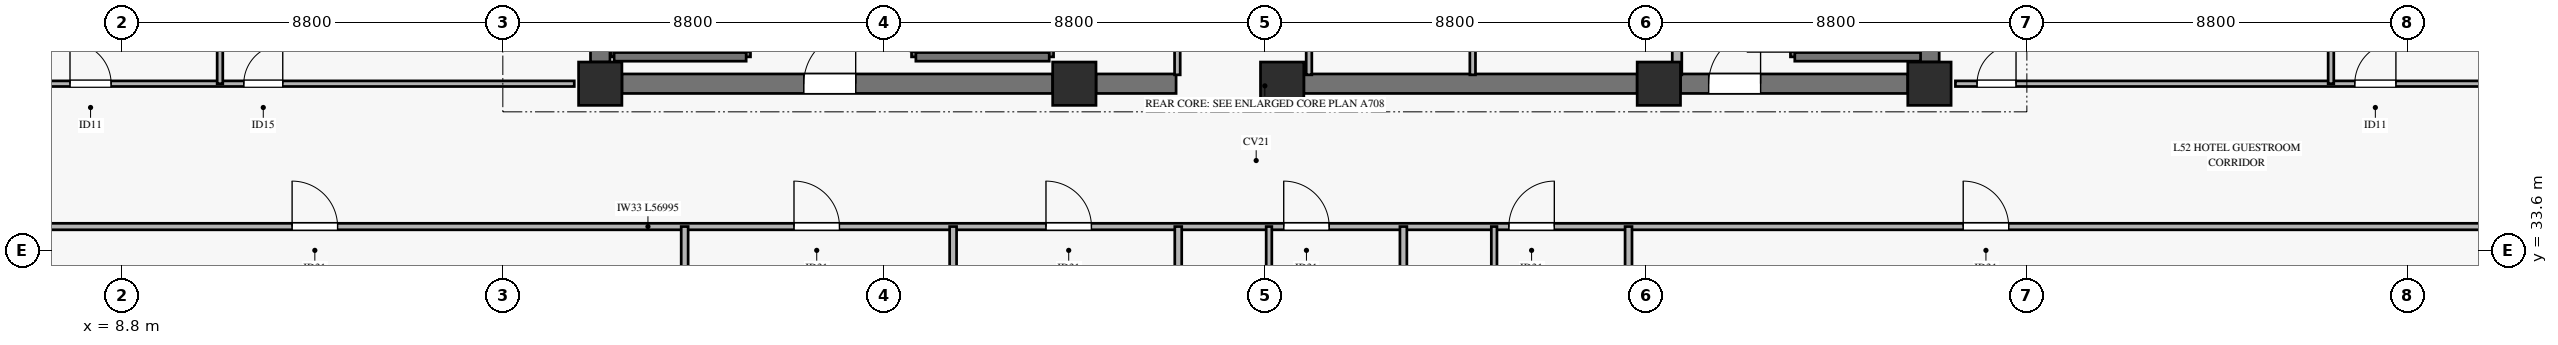
"""IFC4 building model, lengths in metres.
Left out: names, types, materials, properties, quantities, classifications, styles, units other than length and angle.
Written with IfcOpenShell. Run it as: python <this file> out.ifc"""

import sys

from ifc_helpers import new_model, si_unit, direction, frame, frame_2d, origin, origin_2d, place, context, subcontext, project, spatial, rectangle, extrude, source, transform, mapped, element, fill, save


model = new_model("IFC4")
c1 = context("Model", 3, precision=1e-05, world=origin(), true_north=direction((0.0, 1.0)))
c2 = subcontext(c1, "Body", "Model", "MODEL_VIEW")
j1 = project(units=[si_unit("LENGTHUNIT", "METRE"), si_unit("PLANEANGLEUNIT", "RADIAN")], contexts=[c1])
p1 = place(None, origin())
s1 = spatial("IfcSite", under=j1, at=p1, CompositionType="ELEMENT")
p2 = place(p1, origin())
s2 = spatial("IfcBuilding", under=s1, at=p2, CompositionType="ELEMENT")
p3 = place(p2, frame((0.0, 0.0, 206.2)))
s3 = spatial("IfcBuildingStorey", under=s2, at=p3, CompositionType="ELEMENT", Elevation=206.2)
m1 = source(origin(), c2, "Body", "SweptSolid", [
    extrude(rectangle(XDim=1.0, YDim=1.0, at=origin_2d()), origin(), (0.0, 0.0, 1.0), 3.27),
])
for number, where, z_axis, x_axis in (
    (1, (19.85, 37.45, 0.0), (0.0, 0.0, 1.0), (1.0, 0.0, 0.0)),
    (2, (30.8, 37.45, 0.0), (0.0, 0.0, 1.0), (1.0, 0.0, 0.0)),
    (3, (35.6, 37.45, 0.0), (0.0, 0.0, 1.0), (1.0, 0.0, 0.0)),
    (4, (44.3, 37.45, 0.0), (0.0, 0.0, 1.0), (1.0, 0.0, 0.0)),
    (5, (50.55, 37.45, 0.0), (0.0, 0.0, 1.0), (1.0, 0.0, 0.0)),
):
    element("IfcColumn", number, at=place(p3, frame(where, z_axis=z_axis, x_axis=x_axis)), inside=s3, PredefinedType="PILASTER", context=c2, shape_type="MappedRepresentation", body=[
        mapped(m1, transform((0.0, 0.0, 0.0), x_axis=(1.0, 0.0, 0.0), y_axis=(0.0, 1.0, 0.0), z_axis=(0.0, 0.0, 1.0), scale=1.0)),
    ])
p4 = place(p3, frame((20.35, 37.45, 0.0), z_axis=(0.0, 0.0, 1.0), x_axis=(1.0, 0.0, 0.0)))
e6 = element("IfcWall", 6, at=p4, inside=s3, PredefinedType="SHEAR", context=c2, shape_type="SweptSolid", body=[
    extrude(rectangle(XDim=9.95, YDim=0.45, at=frame_2d((4.975, 0.0))), origin(), (0.0, 0.0, 1.0), 3.27),
])
p5 = place(p4, frame((4.2, 0.0, 0.0)))
e7 = element("IfcOpeningElement", 7, at=p5, cuts=e6, PredefinedType="OPENING", context=c2, shape_type="SweptSolid", body=[
    extrude(rectangle(XDim=1.2, YDim=2.15, at=frame_2d((0.6, 1.075))), frame((0.0, 0.235, 0.0), z_axis=(0.0, -1.0, 0.0), x_axis=(1.0, 0.0, 0.0)), (0.0, 0.0, 1.0), 0.47),
])
p6 = place(p3, frame((31.3, 37.45, 0.0), z_axis=(0.0, 0.0, 1.0), x_axis=(1.0, 0.0, 0.0)))
e8 = element("IfcWall", 8, at=p6, inside=s3, PredefinedType="SHEAR", context=c2, shape_type="SweptSolid", body=[
    extrude(rectangle(XDim=1.85, YDim=0.45, at=frame_2d((0.925, 0.0))), origin(), (0.0, 0.0, 1.0), 3.27),
])
p7 = place(p3, frame((36.1, 37.45, 0.0), z_axis=(0.0, 0.0, 1.0), x_axis=(1.0, 0.0, 0.0)))
e9 = element("IfcWall", 9, at=p7, inside=s3, PredefinedType="SHEAR", context=c2, shape_type="SweptSolid", body=[
    extrude(rectangle(XDim=7.7, YDim=0.45, at=frame_2d((3.85, 0.0))), origin(), (0.0, 0.0, 1.0), 3.27),
])
p8 = place(p3, frame((44.8, 37.45, 0.0), z_axis=(0.0, 0.0, 1.0), x_axis=(1.0, 0.0, 0.0)))
e10 = element("IfcWall", 10, at=p8, inside=s3, PredefinedType="SHEAR", context=c2, shape_type="SweptSolid", body=[
    extrude(rectangle(XDim=5.25, YDim=0.45, at=frame_2d((2.625, 0.0))), origin(), (0.0, 0.0, 1.0), 3.27),
])
p9 = place(p8, frame((0.65, 0.0, 0.0)))
e11 = element("IfcOpeningElement", 11, at=p9, cuts=e10, PredefinedType="OPENING", context=c2, shape_type="SweptSolid", body=[
    extrude(rectangle(XDim=1.2, YDim=2.15, at=frame_2d((0.6, 1.075))), frame((0.0, 0.235, 0.0), z_axis=(0.0, -1.0, 0.0), x_axis=(1.0, 0.0, 0.0)), (0.0, 0.0, 1.0), 0.47),
])
for number, where, z_axis, x_axis in (
    (12, (19.85, 37.95, 0.0), (0.0, 0.0, 1.0), (0.0, 1.0, 0.0)),
    (13, (50.55, 37.95, 0.0), (0.0, 0.0, 1.0), (0.0, 1.0, 0.0)),
):
    element("IfcWall", number, at=place(p3, frame(where, z_axis=z_axis, x_axis=x_axis)), inside=s3, PredefinedType="SHEAR", context=c2, shape_type="SweptSolid", body=[
        extrude(rectangle(XDim=8.1, YDim=0.45, at=frame_2d((4.05, 0.0))), origin(), (0.0, 0.0, 1.0), 3.27),
    ])
p10 = place(p3, frame((20.17, 38.07, 0.0), z_axis=(0.0, 0.0, 1.0), x_axis=(0.0, 1.0, 0.0)))
e14 = element("IfcWall", 14, at=p10, inside=s3, PredefinedType="SOLIDWALL", context=c2, shape_type="SweptSolid", body=[
    extrude(rectangle(XDim=7.25, YDim=0.14, at=frame_2d((3.625, 0.0))), origin(), (0.0, 0.0, 1.0), 3.5),
])
p11 = place(p3, frame((23.22, 38.07, 0.0), z_axis=(0.0, 0.0, 1.0), x_axis=(0.0, 1.0, 0.0)))
e15 = element("IfcWall", 15, at=p11, inside=s3, PredefinedType="SOLIDWALL", context=c2, shape_type="SweptSolid", body=[
    extrude(rectangle(XDim=7.25, YDim=0.2, at=frame_2d((3.625, 0.0))), origin(), (0.0, 0.0, 1.0), 3.5),
])
p12 = place(p11, frame((0.11, 0.0, 0.0)))
e16 = element("IfcOpeningElement", 16, at=p12, cuts=e15, PredefinedType="OPENING", context=c2, shape_type="SweptSolid", body=[
    extrude(rectangle(XDim=1.1, YDim=2.15, at=frame_2d((0.55, 1.075))), frame((0.0, 0.11, 0.0), z_axis=(0.0, -1.0, 0.0), x_axis=(1.0, 0.0, 0.0)), (0.0, 0.0, 1.0), 0.22),
])
p13 = place(p3, frame((20.17, 38.07, 0.0), z_axis=(0.0, 0.0, 1.0), x_axis=(1.0, 0.0, 0.0)))
e17 = element("IfcWall", 17, at=p13, inside=s3, PredefinedType="SOLIDWALL", context=c2, shape_type="SweptSolid", body=[
    extrude(rectangle(XDim=3.05, YDim=0.2, at=frame_2d((1.525, 0.0))), origin(), (0.0, 0.0, 1.0), 3.5),
])
p14 = place(p3, frame((27.14, 38.07, 0.0), z_axis=(0.0, 0.0, 1.0), x_axis=(0.0, 1.0, 0.0)))
e18 = element("IfcWall", 18, at=p14, inside=s3, PredefinedType="SOLIDWALL", context=c2, shape_type="SweptSolid", body=[
    extrude(rectangle(XDim=7.25, YDim=0.2, at=frame_2d((3.625, 0.0))), origin(), (0.0, 0.0, 1.0), 3.5),
])
p15 = place(p14, frame((0.11, 0.0, 0.0)))
e19 = element("IfcOpeningElement", 19, at=p15, cuts=e18, PredefinedType="OPENING", context=c2, shape_type="SweptSolid", body=[
    extrude(rectangle(XDim=1.1, YDim=2.15, at=frame_2d((0.55, 1.075))), frame((0.0, 0.11, 0.0), z_axis=(0.0, -1.0, 0.0), x_axis=(1.0, 0.0, 0.0)), (0.0, 0.0, 1.0), 0.22),
])
p16 = place(p3, frame((30.22, 38.07, 0.0), z_axis=(0.0, 0.0, 1.0), x_axis=(0.0, 1.0, 0.0)))
e20 = element("IfcWall", 20, at=p16, inside=s3, PredefinedType="SOLIDWALL", context=c2, shape_type="SweptSolid", body=[
    extrude(rectangle(XDim=7.25, YDim=0.2, at=frame_2d((3.625, 0.0))), origin(), (0.0, 0.0, 1.0), 3.5),
])
p17 = place(p3, frame((27.14, 38.07, 0.0), z_axis=(0.0, 0.0, 1.0), x_axis=(1.0, 0.0, 0.0)))
e21 = element("IfcWall", 21, at=p17, inside=s3, PredefinedType="SOLIDWALL", context=c2, shape_type="SweptSolid", body=[
    extrude(rectangle(XDim=3.08, YDim=0.2, at=frame_2d((1.54, 0.0))), origin(), (0.0, 0.0, 1.0), 3.5),
])
p18 = place(p3, frame((47.44, 38.07, 0.0), z_axis=(0.0, 0.0, 1.0), x_axis=(0.0, 1.0, 0.0)))
e22 = element("IfcWall", 22, at=p18, inside=s3, PredefinedType="SOLIDWALL", context=c2, shape_type="SweptSolid", body=[
    extrude(rectangle(XDim=7.25, YDim=0.2, at=frame_2d((3.625, 0.0))), origin(), (0.0, 0.0, 1.0), 3.5),
])
p19 = place(p18, frame((0.11, 0.0, 0.0)))
e23 = element("IfcOpeningElement", 23, at=p19, cuts=e22, PredefinedType="OPENING", context=c2, shape_type="SweptSolid", body=[
    extrude(rectangle(XDim=1.1, YDim=2.15, at=frame_2d((0.55, 1.075))), frame((0.0, 0.11, 0.0), z_axis=(0.0, -1.0, 0.0), x_axis=(1.0, 0.0, 0.0)), (0.0, 0.0, 1.0), 0.22),
])
p20 = place(p3, frame((47.44, 38.07, 0.0), z_axis=(0.0, 0.0, 1.0), x_axis=(1.0, 0.0, 0.0)))
e24 = element("IfcWall", 24, at=p20, inside=s3, PredefinedType="SOLIDWALL", context=c2, shape_type="SweptSolid", body=[
    extrude(rectangle(XDim=2.905, YDim=0.2, at=frame_2d((1.453, 0.0))), origin(), (0.0, 0.0, 1.0), 3.5),
])
p21 = place(p3, frame((44.72, 37.655, 0.0), z_axis=(0.0, 0.0, 1.0), x_axis=(0.0, 1.0, 0.0)))
e25 = element("IfcWall", 25, at=p21, inside=s3, PredefinedType="SOLIDWALL", context=c2, shape_type="SweptSolid", body=[
    extrude(rectangle(XDim=7.565, YDim=0.22, at=frame_2d((3.782, 0.0))), origin(), (0.0, 0.0, 1.0), 3.27),
])
p22 = place(p3, frame((33.18, 37.655, 0.0), z_axis=(0.0, 0.0, 1.0), x_axis=(0.0, 1.0, 0.0)))
e26 = element("IfcWall", 26, at=p22, inside=s3, PredefinedType="PARTITIONING", context=c2, shape_type="SweptSolid", body=[
    extrude(rectangle(XDim=6.495, YDim=0.13, at=frame_2d((3.248, 0.0))), origin(), (0.0, 0.0, 1.0), 2.355),
])
p23 = place(p22, frame((2.245, 0.0, 0.0)))
e27 = element("IfcOpeningElement", 27, at=p23, cuts=e26, PredefinedType="OPENING", context=c2, shape_type="SweptSolid", body=[
    extrude(rectangle(XDim=0.9, YDim=2.1, at=frame_2d((0.45, 1.05))), frame((0.0, 0.075, 0.0), z_axis=(0.0, -1.0, 0.0), x_axis=(1.0, 0.0, 0.0)), (0.0, 0.0, 1.0), 0.15),
])
p24 = place(p3, frame((36.22, 37.655, 0.0), z_axis=(0.0, 0.0, 1.0), x_axis=(0.0, 1.0, 0.0)))
e28 = element("IfcWall", 28, at=p24, inside=s3, PredefinedType="PARTITIONING", context=c2, shape_type="SweptSolid", body=[
    extrude(rectangle(XDim=2.265, YDim=0.13, at=frame_2d((1.132, 0.0))), origin(), (0.0, 0.0, 1.0), 3.27),
])
p25 = place(p24, frame((0.905, 0.0, 0.0)))
e29 = element("IfcOpeningElement", 29, at=p25, cuts=e28, PredefinedType="OPENING", context=c2, shape_type="SweptSolid", body=[
    extrude(rectangle(XDim=0.9, YDim=2.1, at=frame_2d((0.45, 1.05))), frame((0.0, 0.075, 0.0), z_axis=(0.0, -1.0, 0.0), x_axis=(1.0, 0.0, 0.0)), (0.0, 0.0, 1.0), 0.15),
])
p26 = place(p3, frame((40.0, 37.655, 0.0), z_axis=(0.0, 0.0, 1.0), x_axis=(0.0, 1.0, 0.0)))
e30 = element("IfcWall", 30, at=p26, inside=s3, PredefinedType="PARTITIONING", context=c2, shape_type="SweptSolid", body=[
    extrude(rectangle(XDim=2.265, YDim=0.13, at=frame_2d((1.132, 0.0))), origin(), (0.0, 0.0, 1.0), 3.27),
])
p27 = place(p26, frame((0.665, 0.0, 0.0)))
e31 = element("IfcOpeningElement", 31, at=p27, cuts=e30, PredefinedType="OPENING", context=c2, shape_type="SweptSolid", body=[
    extrude(rectangle(XDim=0.9, YDim=2.1, at=frame_2d((0.45, 1.05))), frame((0.0, 0.075, 0.0), z_axis=(0.0, -1.0, 0.0), x_axis=(1.0, 0.0, 0.0)), (0.0, 0.0, 1.0), 0.15),
])
p28 = place(p3, frame((6.703, 34.15, 0.0), z_axis=(0.0, 0.0, 1.0), x_axis=(1.0, 0.0, 0.0)))
e32 = element("IfcWall", 32, at=p28, inside=s3, PredefinedType="PARTITIONING", context=c2, shape_type="SweptSolid", body=[
    extrude(rectangle(XDim=56.995, YDim=0.15, at=frame_2d((28.498, 0.0))), origin(), (0.0, 0.0, 1.0), 2.455),
])
p29 = place(p28, frame((6.03, 0.0, 0.0)))
e33 = element("IfcOpeningElement", 33, at=p29, cuts=e32, PredefinedType="OPENING", context=c2, shape_type="SweptSolid", body=[
    extrude(rectangle(XDim=1.05, YDim=2.15, at=frame_2d((0.525, 1.075))), frame((0.0, 0.085, 0.0), z_axis=(0.0, -1.0, 0.0), x_axis=(1.0, 0.0, 0.0)), (0.0, 0.0, 1.0), 0.17),
])
p30 = place(p28, frame((17.622, 0.0, 0.0)))
e34 = element("IfcOpeningElement", 34, at=p30, cuts=e32, PredefinedType="OPENING", context=c2, shape_type="SweptSolid", body=[
    extrude(rectangle(XDim=1.05, YDim=2.15, at=frame_2d((0.525, 1.075))), frame((0.0, 0.085, 0.0), z_axis=(0.0, -1.0, 0.0), x_axis=(1.0, 0.0, 0.0)), (0.0, 0.0, 1.0), 0.17),
])
p31 = place(p28, frame((23.442, 0.0, 0.0)))
e35 = element("IfcOpeningElement", 35, at=p31, cuts=e32, PredefinedType="OPENING", context=c2, shape_type="SweptSolid", body=[
    extrude(rectangle(XDim=1.05, YDim=2.15, at=frame_2d((0.525, 1.075))), frame((0.0, 0.085, 0.0), z_axis=(0.0, -1.0, 0.0), x_axis=(1.0, 0.0, 0.0)), (0.0, 0.0, 1.0), 0.17),
])
p32 = place(p28, frame((28.933, 0.0, 0.0)))
e36 = element("IfcOpeningElement", 36, at=p32, cuts=e32, PredefinedType="OPENING", context=c2, shape_type="SweptSolid", body=[
    extrude(rectangle(XDim=1.05, YDim=2.15, at=frame_2d((0.525, 1.075))), frame((0.0, 0.085, 0.0), z_axis=(0.0, -1.0, 0.0), x_axis=(1.0, 0.0, 0.0)), (0.0, 0.0, 1.0), 0.17),
])
p33 = place(p28, frame((34.133, 0.0, 0.0)))
e37 = element("IfcOpeningElement", 37, at=p33, cuts=e32, PredefinedType="OPENING", context=c2, shape_type="SweptSolid", body=[
    extrude(rectangle(XDim=1.05, YDim=2.15, at=frame_2d((0.525, 1.075))), frame((0.0, 0.085, 0.0), z_axis=(0.0, -1.0, 0.0), x_axis=(1.0, 0.0, 0.0)), (0.0, 0.0, 1.0), 0.17),
])
p34 = place(p28, frame((44.627, 0.0, 0.0)))
e38 = element("IfcOpeningElement", 38, at=p34, cuts=e32, PredefinedType="OPENING", context=c2, shape_type="SweptSolid", body=[
    extrude(rectangle(XDim=1.05, YDim=2.15, at=frame_2d((0.525, 1.075))), frame((0.0, 0.085, 0.0), z_axis=(0.0, -1.0, 0.0), x_axis=(1.0, 0.0, 0.0)), (0.0, 0.0, 1.0), 0.17),
])
for number, where, z_axis, x_axis in (
    (39, (21.8, 11.386, 0.0), (0.0, 0.0, 1.0), (0.0, 1.0, 0.0)),
    (40, (28.0, 11.386, 0.0), (0.0, 0.0, 1.0), (0.0, 1.0, 0.0)),
    (41, (33.2, 11.386, 0.0), (0.0, 0.0, 1.0), (0.0, 1.0, 0.0)),
):
    element("IfcWall", number, at=place(p3, frame(where, z_axis=z_axis, x_axis=x_axis)), inside=s3, PredefinedType="PARTITIONING", context=c2, shape_type="SweptSolid", body=[
        extrude(rectangle(XDim=22.764, YDim=0.16, at=frame_2d((11.382, 0.0))), origin(), (0.0, 0.0, 1.0), 2.755),
    ])
p35 = place(p3, frame((35.296, 31.6, 0.0), z_axis=(0.0, 0.0, 1.0), x_axis=(0.0, 1.0, 0.0)))
e42 = element("IfcWall", 42, at=p35, inside=s3, PredefinedType="PARTITIONING", context=c2, shape_type="SweptSolid", body=[
    extrude(rectangle(XDim=2.55, YDim=0.13, at=frame_2d((1.275, 0.0))), origin(), (0.0, 0.0, 1.0), 2.855),
])
p36 = place(p3, frame((38.4, 11.386, 0.0), z_axis=(0.0, 0.0, 1.0), x_axis=(0.0, 1.0, 0.0)))
e43 = element("IfcWall", 43, at=p36, inside=s3, PredefinedType="PARTITIONING", context=c2, shape_type="SweptSolid", body=[
    extrude(rectangle(XDim=22.764, YDim=0.16, at=frame_2d((11.382, 0.0))), origin(), (0.0, 0.0, 1.0), 2.755),
])
p37 = place(p3, frame((40.496, 31.6, 0.0), z_axis=(0.0, 0.0, 1.0), x_axis=(0.0, 1.0, 0.0)))
e44 = element("IfcWall", 44, at=p37, inside=s3, PredefinedType="PARTITIONING", context=c2, shape_type="SweptSolid", body=[
    extrude(rectangle(XDim=2.55, YDim=0.13, at=frame_2d((1.275, 0.0))), origin(), (0.0, 0.0, 1.0), 2.855),
])
p38 = place(p3, frame((43.6, 11.386, 0.0), z_axis=(0.0, 0.0, 1.0), x_axis=(0.0, 1.0, 0.0)))
e45 = element("IfcWall", 45, at=p38, inside=s3, PredefinedType="PARTITIONING", context=c2, shape_type="SweptSolid", body=[
    extrude(rectangle(XDim=22.764, YDim=0.16, at=frame_2d((11.382, 0.0))), origin(), (0.0, 0.0, 1.0), 2.755),
])
p39 = place(p3, frame((6.703, 37.45, 0.0), z_axis=(0.0, 0.0, 1.0), x_axis=(1.0, 0.0, 0.0)))
e46 = element("IfcWall", 46, at=p39, inside=s3, PredefinedType="PARTITIONING", context=c2, shape_type="SweptSolid", body=[
    extrude(rectangle(XDim=12.547, YDim=0.13, at=frame_2d((6.273, 0.0))), origin(), (0.0, 0.0, 1.0), 2.755),
])
p40 = place(p39, frame((0.9, 0.0, 0.0)))
e47 = element("IfcOpeningElement", 47, at=p40, cuts=e46, PredefinedType="OPENING", context=c2, shape_type="SweptSolid", body=[
    extrude(rectangle(XDim=0.95, YDim=2.1, at=frame_2d((0.475, 1.05))), frame((0.0, 0.075, 0.0), z_axis=(0.0, -1.0, 0.0), x_axis=(1.0, 0.0, 0.0)), (0.0, 0.0, 1.0), 0.15),
])
p41 = place(p39, frame((4.914, 0.0, 0.0)))
e48 = element("IfcOpeningElement", 48, at=p41, cuts=e46, PredefinedType="OPENING", context=c2, shape_type="SweptSolid", body=[
    extrude(rectangle(XDim=0.9, YDim=2.1, at=frame_2d((0.45, 1.05))), frame((0.0, 0.075, 0.0), z_axis=(0.0, -1.0, 0.0), x_axis=(1.0, 0.0, 0.0)), (0.0, 0.0, 1.0), 0.15),
])
p42 = place(p3, frame((11.067, 37.45, 0.0), z_axis=(0.0, 0.0, 1.0), x_axis=(0.0, 1.0, 0.0)))
e49 = element("IfcWall", 49, at=p42, inside=s3, PredefinedType="PARTITIONING", context=c2, shape_type="SweptSolid", body=[
    extrude(rectangle(XDim=8.8, YDim=0.13, at=frame_2d((4.4, 0.0))), origin(), (0.0, 0.0, 1.0), 3.27),
])
p43 = place(p3, frame((51.15, 37.45, 0.0), z_axis=(0.0, 0.0, 1.0), x_axis=(1.0, 0.0, 0.0)))
e50 = element("IfcWall", 50, at=p43, inside=s3, PredefinedType="PARTITIONING", context=c2, shape_type="SweptSolid", body=[
    extrude(rectangle(XDim=12.548, YDim=0.13, at=frame_2d((6.274, 0.0))), origin(), (0.0, 0.0, 1.0), 2.755),
])
p44 = place(p43, frame((0.5, 0.0, 0.0)))
e51 = element("IfcOpeningElement", 51, at=p44, cuts=e50, PredefinedType="OPENING", context=c2, shape_type="SweptSolid", body=[
    extrude(rectangle(XDim=0.9, YDim=2.1, at=frame_2d((0.45, 1.05))), frame((0.0, 0.075, 0.0), z_axis=(0.0, -1.0, 0.0), x_axis=(1.0, 0.0, 0.0)), (0.0, 0.0, 1.0), 0.15),
])
p45 = place(p43, frame((9.224, 0.0, 0.0)))
e52 = element("IfcOpeningElement", 52, at=p45, cuts=e50, PredefinedType="OPENING", context=c2, shape_type="SweptSolid", body=[
    extrude(rectangle(XDim=0.95, YDim=2.1, at=frame_2d((0.475, 1.05))), frame((0.0, 0.075, 0.0), z_axis=(0.0, -1.0, 0.0), x_axis=(1.0, 0.0, 0.0)), (0.0, 0.0, 1.0), 0.15),
])
p46 = place(p3, frame((59.824, 37.45, 0.0), z_axis=(0.0, 0.0, 1.0), x_axis=(0.0, 1.0, 0.0)))
e53 = element("IfcWall", 53, at=p46, inside=s3, PredefinedType="PARTITIONING", context=c2, shape_type="SweptSolid", body=[
    extrude(rectangle(XDim=8.8, YDim=0.13, at=frame_2d((4.4, 0.0))), origin(), (0.0, 0.0, 1.0), 2.755),
])
m2 = source(origin(), c2, "Body", "SweptSolid", [
    extrude(rectangle(XDim=1.2, YDim=2.15, at=frame_2d((0.6, 1.075))), frame((0.0, 0.025, 0.0), z_axis=(0.0, -1.0, 0.0), x_axis=(1.0, 0.0, 0.0)), (0.0, 0.0, 1.0), 0.05),
])
p47 = place(p5, origin())
e54 = element("IfcDoor", 54, at=p47, inside=s3, OperationType="SINGLE_SWING_RIGHT", PredefinedType="DOOR", context=c2, shape_type="MappedRepresentation", body=[
    mapped(m2, transform((0.0, 0.0, 0.0), x_axis=(1.0, 0.0, 0.0), y_axis=(0.0, 1.0, 0.0), z_axis=(0.0, 0.0, 1.0), scale=1.0)),
])
fill(e7, e54)
p48 = place(p9, origin())
e55 = element("IfcDoor", 55, at=p48, inside=s3, OperationType="SINGLE_SWING_RIGHT", PredefinedType="DOOR", context=c2, shape_type="MappedRepresentation", body=[
    mapped(m2, transform((0.0, 0.0, 0.0), x_axis=(1.0, 0.0, 0.0), y_axis=(0.0, 1.0, 0.0), z_axis=(0.0, 0.0, 1.0), scale=1.0)),
])
fill(e11, e55)
m3 = source(origin(), c2, "Body", "SweptSolid", [
    extrude(rectangle(XDim=1.05, YDim=2.15, at=frame_2d((0.525, 1.075))), frame((0.0, 0.025, 0.0), z_axis=(0.0, -1.0, 0.0), x_axis=(1.0, 0.0, 0.0)), (0.0, 0.0, 1.0), 0.05),
])
p49 = place(p29, origin())
e56 = element("IfcDoor", 56, at=p49, inside=s3, OperationType="SINGLE_SWING_LEFT", PredefinedType="DOOR", context=c2, shape_type="MappedRepresentation", body=[
    mapped(m3, transform((0.0, 0.0, 0.0), x_axis=(1.0, 0.0, 0.0), y_axis=(0.0, 1.0, 0.0), z_axis=(0.0, 0.0, 1.0), scale=1.0)),
])
fill(e33, e56)
p50 = place(p30, origin())
e57 = element("IfcDoor", 57, at=p50, inside=s3, OperationType="SINGLE_SWING_LEFT", PredefinedType="DOOR", context=c2, shape_type="MappedRepresentation", body=[
    mapped(m3, transform((0.0, 0.0, 0.0), x_axis=(1.0, 0.0, 0.0), y_axis=(0.0, 1.0, 0.0), z_axis=(0.0, 0.0, 1.0), scale=1.0)),
])
fill(e34, e57)
p51 = place(p31, origin())
e58 = element("IfcDoor", 58, at=p51, inside=s3, OperationType="SINGLE_SWING_LEFT", PredefinedType="DOOR", context=c2, shape_type="MappedRepresentation", body=[
    mapped(m3, transform((0.0, 0.0, 0.0), x_axis=(1.0, 0.0, 0.0), y_axis=(0.0, 1.0, 0.0), z_axis=(0.0, 0.0, 1.0), scale=1.0)),
])
fill(e35, e58)
p52 = place(p32, origin())
e59 = element("IfcDoor", 59, at=p52, inside=s3, OperationType="SINGLE_SWING_LEFT", PredefinedType="DOOR", context=c2, shape_type="MappedRepresentation", body=[
    mapped(m3, transform((0.0, 0.0, 0.0), x_axis=(1.0, 0.0, 0.0), y_axis=(0.0, 1.0, 0.0), z_axis=(0.0, 0.0, 1.0), scale=1.0)),
])
fill(e36, e59)
p53 = place(p33, origin())
e60 = element("IfcDoor", 60, at=p53, inside=s3, OperationType="SINGLE_SWING_RIGHT", PredefinedType="DOOR", context=c2, shape_type="MappedRepresentation", body=[
    mapped(m3, transform((0.0, 0.0, 0.0), x_axis=(1.0, 0.0, 0.0), y_axis=(0.0, 1.0, 0.0), z_axis=(0.0, 0.0, 1.0), scale=1.0)),
])
fill(e37, e60)
p54 = place(p34, origin())
e61 = element("IfcDoor", 61, at=p54, inside=s3, OperationType="SINGLE_SWING_LEFT", PredefinedType="DOOR", context=c2, shape_type="MappedRepresentation", body=[
    mapped(m3, transform((0.0, 0.0, 0.0), x_axis=(1.0, 0.0, 0.0), y_axis=(0.0, 1.0, 0.0), z_axis=(0.0, 0.0, 1.0), scale=1.0)),
])
fill(e38, e61)
m4 = source(origin(), c2, "Body", "SweptSolid", [
    extrude(rectangle(XDim=0.95, YDim=2.1, at=frame_2d((0.475, 1.05))), frame((0.0, 0.025, 0.0), z_axis=(0.0, -1.0, 0.0), x_axis=(1.0, 0.0, 0.0)), (0.0, 0.0, 1.0), 0.05),
])
p55 = place(p40, origin())
e62 = element("IfcDoor", 62, at=p55, inside=s3, OperationType="SINGLE_SWING_LEFT", PredefinedType="DOOR", context=c2, shape_type="MappedRepresentation", body=[
    mapped(m4, transform((0.0, 0.0, 0.0), x_axis=(1.0, 0.0, 0.0), y_axis=(0.0, 1.0, 0.0), z_axis=(0.0, 0.0, 1.0), scale=1.0)),
])
fill(e47, e62)
m5 = source(origin(), c2, "Body", "SweptSolid", [
    extrude(rectangle(XDim=0.9, YDim=2.1, at=frame_2d((0.45, 1.05))), frame((0.0, 0.025, 0.0), z_axis=(0.0, -1.0, 0.0), x_axis=(1.0, 0.0, 0.0)), (0.0, 0.0, 1.0), 0.05),
])
p56 = place(p41, origin())
e63 = element("IfcDoor", 63, at=p56, inside=s3, OperationType="SINGLE_SWING_RIGHT", PredefinedType="DOOR", context=c2, shape_type="MappedRepresentation", body=[
    mapped(m5, transform((0.0, 0.0, 0.0), x_axis=(1.0, 0.0, 0.0), y_axis=(0.0, 1.0, 0.0), z_axis=(0.0, 0.0, 1.0), scale=1.0)),
])
fill(e48, e63)
p57 = place(p44, origin())
e64 = element("IfcDoor", 64, at=p57, inside=s3, OperationType="SINGLE_SWING_RIGHT", PredefinedType="DOOR", context=c2, shape_type="MappedRepresentation", body=[
    mapped(m5, transform((0.0, 0.0, 0.0), x_axis=(1.0, 0.0, 0.0), y_axis=(0.0, 1.0, 0.0), z_axis=(0.0, 0.0, 1.0), scale=1.0)),
])
fill(e51, e64)
p58 = place(p45, origin())
e65 = element("IfcDoor", 65, at=p58, inside=s3, OperationType="SINGLE_SWING_RIGHT", PredefinedType="DOOR", context=c2, shape_type="MappedRepresentation", body=[
    mapped(m4, transform((0.0, 0.0, 0.0), x_axis=(1.0, 0.0, 0.0), y_axis=(0.0, 1.0, 0.0), z_axis=(0.0, 0.0, 1.0), scale=1.0)),
])
fill(e52, e65)
save(model, sys.argv[1])
